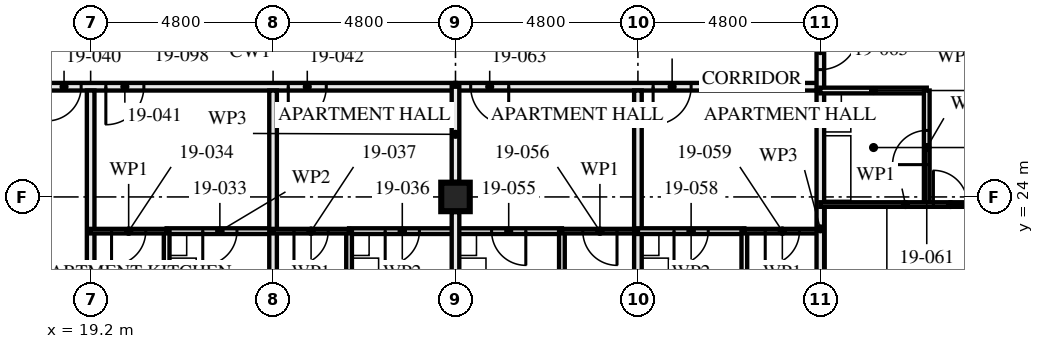
"""IFC4 building model, lengths in metres.
Left out: names, types, materials, properties, quantities, classifications, styles, units other than length and angle.
Written with IfcOpenShell. Run it as: python <this file> out.ifc"""

import sys

from ifc_helpers import new_model, si_unit, direction, frame, frame_2d, origin, origin_2d, place, context, subcontext, project, spatial, rectangle, hollow_rectangle, extrude, element, fill, save


model = new_model("IFC4")
c1 = context("Model", 3, precision=1e-05, world=origin(), true_north=direction((0.0, 1.0)))
c2 = subcontext(c1, "Body", "Model", "MODEL_VIEW")
j1 = project(units=[si_unit("LENGTHUNIT", "METRE"), si_unit("PLANEANGLEUNIT", "RADIAN")], contexts=[c1])
p1 = place(None, origin())
s1 = spatial("IfcSite", under=j1, at=p1, CompositionType="ELEMENT")
p2 = place(p1, origin())
s2 = spatial("IfcBuilding", under=s1, at=p2, CompositionType="ELEMENT")
p3 = place(p2, frame((0.0, 0.0, 72.5)))
s3 = spatial("IfcBuildingStorey", under=s2, at=p3, CompositionType="ELEMENT", Elevation=72.5)
p4 = place(p3, frame((28.8, 24.0, 0.0), z_axis=(0.0, 0.0, 1.0), x_axis=(1.0, 0.0, 0.0)))
e1 = element("IfcColumn", 1, at=p4, inside=s3, PredefinedType="COLUMN", context=c2, shape_type="SweptSolid", body=[
    extrude(hollow_rectangle(XDim=0.75, YDim=0.75, WallThickness=0.08, at=origin_2d()), origin(), (0.0, 0.0, 1.0), 3.5),
])
p5 = place(p3, frame((19.2, 14.72, 0.0), z_axis=(0.0, 0.0, 1.0), x_axis=(0.0, 1.0, 0.0)))
e2 = element("IfcWall", 2, at=p5, inside=s3, PredefinedType="PARTITIONING", context=c2, shape_type="SweptSolid", body=[
    extrude(rectangle(XDim=12.08, YDim=0.2, at=frame_2d((6.04, 0.0))), origin(), (0.0, 0.0, 1.0), 2.55),
])
p6 = place(p3, frame((21.2, 20.1, 0.0), z_axis=(0.0, 0.0, 1.0), x_axis=(0.0, 1.0, 0.0)))
e3 = element("IfcWall", 3, at=p6, inside=s3, PredefinedType="PARTITIONING", context=c2, shape_type="SweptSolid", body=[
    extrude(rectangle(XDim=3.0, YDim=0.15, at=frame_2d((1.5, 0.0))), origin(), (0.0, 0.0, 1.0), 3.33),
])
p7 = place(p3, frame((21.2, 23.1, 0.0), z_axis=(0.0, 0.0, 1.0), x_axis=(1.0, 0.0, 0.0)))
e4 = element("IfcWall", 4, at=p7, inside=s3, PredefinedType="PARTITIONING", context=c2, shape_type="SweptSolid", body=[
    extrude(rectangle(XDim=2.8, YDim=0.15, at=frame_2d((1.4, 0.0))), origin(), (0.0, 0.0, 1.0), 3.33),
])
p8 = place(p7, frame((0.95, 0.0, 0.0)))
e5 = element("IfcOpeningElement", 5, at=p8, cuts=e4, PredefinedType="OPENING", context=c2, shape_type="SweptSolid", body=[
    extrude(rectangle(XDim=0.9, YDim=2.1, at=frame_2d((0.45, 1.05))), frame((0.0, 0.085, 0.0), z_axis=(0.0, -1.0, 0.0), x_axis=(1.0, 0.0, 0.0)), (0.0, 0.0, 1.0), 0.171),
])
p9 = place(p3, frame((19.2, 23.1, 0.0), z_axis=(0.0, 0.0, 1.0), x_axis=(1.0, 0.0, 0.0)))
e6 = element("IfcWall", 6, at=p9, inside=s3, PredefinedType="PARTITIONING", context=c2, shape_type="SweptSolid", body=[
    extrude(rectangle(XDim=2.0, YDim=0.12, at=frame_2d((1.0, 0.0))), origin(), (0.0, 0.0, 1.0), 3.33),
])
p10 = place(p9, frame((0.55, 0.0, 0.0)))
e7 = element("IfcOpeningElement", 7, at=p10, cuts=e6, PredefinedType="OPENING", context=c2, shape_type="SweptSolid", body=[
    extrude(rectangle(XDim=0.9, YDim=2.1, at=frame_2d((0.45, 1.05))), frame((0.0, 0.071, 0.0), z_axis=(0.0, -1.0, 0.0), x_axis=(1.0, 0.0, 0.0)), (0.0, 0.0, 1.0), 0.141),
])
p11 = place(p3, frame((24.0, 14.72, 0.0), z_axis=(0.0, 0.0, 1.0), x_axis=(0.0, 1.0, 0.0)))
e8 = element("IfcWall", 8, at=p11, inside=s3, PredefinedType="PARTITIONING", context=c2, shape_type="SweptSolid", body=[
    extrude(rectangle(XDim=12.08, YDim=0.2, at=frame_2d((6.04, 0.0))), origin(), (0.0, 0.0, 1.0), 2.55),
])
p12 = place(p3, frame((26.0, 20.1, 0.0), z_axis=(0.0, 0.0, 1.0), x_axis=(0.0, 1.0, 0.0)))
e9 = element("IfcWall", 9, at=p12, inside=s3, PredefinedType="PARTITIONING", context=c2, shape_type="SweptSolid", body=[
    extrude(rectangle(XDim=3.0, YDim=0.15, at=frame_2d((1.5, 0.0))), origin(), (0.0, 0.0, 1.0), 3.33),
])
p13 = place(p3, frame((26.0, 23.1, 0.0), z_axis=(0.0, 0.0, 1.0), x_axis=(1.0, 0.0, 0.0)))
e10 = element("IfcWall", 10, at=p13, inside=s3, PredefinedType="PARTITIONING", context=c2, shape_type="SweptSolid", body=[
    extrude(rectangle(XDim=2.8, YDim=0.15, at=frame_2d((1.4, 0.0))), origin(), (0.0, 0.0, 1.0), 3.33),
])
p14 = place(p13, frame((0.95, 0.0, 0.0)))
e11 = element("IfcOpeningElement", 11, at=p14, cuts=e10, PredefinedType="OPENING", context=c2, shape_type="SweptSolid", body=[
    extrude(rectangle(XDim=0.9, YDim=2.1, at=frame_2d((0.45, 1.05))), frame((0.0, 0.085, 0.0), z_axis=(0.0, -1.0, 0.0), x_axis=(1.0, 0.0, 0.0)), (0.0, 0.0, 1.0), 0.171),
])
p15 = place(p3, frame((24.0, 23.1, 0.0), z_axis=(0.0, 0.0, 1.0), x_axis=(1.0, 0.0, 0.0)))
e12 = element("IfcWall", 12, at=p15, inside=s3, PredefinedType="PARTITIONING", context=c2, shape_type="SweptSolid", body=[
    extrude(rectangle(XDim=2.0, YDim=0.12, at=frame_2d((1.0, 0.0))), origin(), (0.0, 0.0, 1.0), 3.33),
])
p16 = place(p15, frame((0.55, 0.0, 0.0)))
e13 = element("IfcOpeningElement", 13, at=p16, cuts=e12, PredefinedType="OPENING", context=c2, shape_type="SweptSolid", body=[
    extrude(rectangle(XDim=0.9, YDim=2.1, at=frame_2d((0.45, 1.05))), frame((0.0, 0.071, 0.0), z_axis=(0.0, -1.0, 0.0), x_axis=(1.0, 0.0, 0.0)), (0.0, 0.0, 1.0), 0.141),
])
p17 = place(p3, frame((14.4, 26.9, 0.0), z_axis=(0.0, 0.0, 1.0), x_axis=(1.0, 0.0, 0.0)))
e14 = element("IfcWall", 14, at=p17, inside=s3, PredefinedType="PARTITIONING", context=c2, shape_type="SweptSolid", body=[
    extrude(rectangle(XDim=14.4, YDim=0.2, at=frame_2d((7.2, 0.0))), origin(), (0.0, 0.0, 1.0), 2.55),
])
p18 = place(p17, frame((1.4, 0.0, 0.0)))
e15 = element("IfcOpeningElement", 15, at=p18, cuts=e14, PredefinedType="OPENING", context=c2, shape_type="SweptSolid", body=[
    extrude(rectangle(XDim=1.0, YDim=2.1, at=frame_2d((0.5, 1.05))), frame((0.0, 0.111, 0.0), z_axis=(0.0, -1.0, 0.0), x_axis=(1.0, 0.0, 0.0)), (0.0, 0.0, 1.0), 0.221),
])
p19 = place(p17, frame((3.65, 0.0, 0.0)))
e16 = element("IfcOpeningElement", 16, at=p19, cuts=e14, PredefinedType="OPENING", context=c2, shape_type="SweptSolid", body=[
    extrude(rectangle(XDim=0.9, YDim=2.1, at=frame_2d((0.45, 1.05))), frame((0.0, 0.111, 0.0), z_axis=(0.0, -1.0, 0.0), x_axis=(1.0, 0.0, 0.0)), (0.0, 0.0, 1.0), 0.221),
])
p20 = place(p17, frame((5.2, 0.0, 0.0)))
e17 = element("IfcOpeningElement", 17, at=p20, cuts=e14, PredefinedType="OPENING", context=c2, shape_type="SweptSolid", body=[
    extrude(rectangle(XDim=1.0, YDim=2.1, at=frame_2d((0.5, 1.05))), frame((0.0, 0.111, 0.0), z_axis=(0.0, -1.0, 0.0), x_axis=(1.0, 0.0, 0.0)), (0.0, 0.0, 1.0), 0.221),
])
p21 = place(p17, frame((10.0, 0.0, 0.0)))
e18 = element("IfcOpeningElement", 18, at=p21, cuts=e14, PredefinedType="OPENING", context=c2, shape_type="SweptSolid", body=[
    extrude(rectangle(XDim=1.0, YDim=2.1, at=frame_2d((0.5, 1.05))), frame((0.0, 0.111, 0.0), z_axis=(0.0, -1.0, 0.0), x_axis=(1.0, 0.0, 0.0)), (0.0, 0.0, 1.0), 0.221),
])
p22 = place(p3, frame((31.6, 20.1, 0.0), z_axis=(0.0, 0.0, 1.0), x_axis=(0.0, 1.0, 0.0)))
e19 = element("IfcWall", 19, at=p22, inside=s3, PredefinedType="PARTITIONING", context=c2, shape_type="SweptSolid", body=[
    extrude(rectangle(XDim=3.0, YDim=0.15, at=frame_2d((1.5, 0.0))), origin(), (0.0, 0.0, 1.0), 3.33),
])
p23 = place(p3, frame((28.8, 23.1, 0.0), z_axis=(0.0, 0.0, 1.0), x_axis=(1.0, 0.0, 0.0)))
e20 = element("IfcWall", 20, at=p23, inside=s3, PredefinedType="PARTITIONING", context=c2, shape_type="SweptSolid", body=[
    extrude(rectangle(XDim=2.8, YDim=0.15, at=frame_2d((1.4, 0.0))), origin(), (0.0, 0.0, 1.0), 3.33),
])
p24 = place(p23, frame((0.95, 0.0, 0.0)))
e21 = element("IfcOpeningElement", 21, at=p24, cuts=e20, PredefinedType="OPENING", context=c2, shape_type="SweptSolid", body=[
    extrude(rectangle(XDim=0.9, YDim=2.1, at=frame_2d((0.45, 1.05))), frame((0.0, 0.085, 0.0), z_axis=(0.0, -1.0, 0.0), x_axis=(1.0, 0.0, 0.0)), (0.0, 0.0, 1.0), 0.171),
])
p25 = place(p3, frame((31.6, 23.1, 0.0), z_axis=(0.0, 0.0, 1.0), x_axis=(1.0, 0.0, 0.0)))
e22 = element("IfcWall", 22, at=p25, inside=s3, PredefinedType="PARTITIONING", context=c2, shape_type="SweptSolid", body=[
    extrude(rectangle(XDim=2.0, YDim=0.12, at=frame_2d((1.0, 0.0))), origin(), (0.0, 0.0, 1.0), 3.33),
])
p26 = place(p25, frame((0.55, 0.0, 0.0)))
e23 = element("IfcOpeningElement", 23, at=p26, cuts=e22, PredefinedType="OPENING", context=c2, shape_type="SweptSolid", body=[
    extrude(rectangle(XDim=0.9, YDim=2.1, at=frame_2d((0.45, 1.05))), frame((0.0, 0.071, 0.0), z_axis=(0.0, -1.0, 0.0), x_axis=(1.0, 0.0, 0.0)), (0.0, 0.0, 1.0), 0.141),
])
p27 = place(p3, frame((33.6, 14.72, 0.0), z_axis=(0.0, 0.0, 1.0), x_axis=(0.0, 1.0, 0.0)))
e24 = element("IfcWall", 24, at=p27, inside=s3, PredefinedType="PARTITIONING", context=c2, shape_type="SweptSolid", body=[
    extrude(rectangle(XDim=12.08, YDim=0.2, at=frame_2d((6.04, 0.0))), origin(), (0.0, 0.0, 1.0), 2.55),
])
p28 = place(p3, frame((36.4, 20.1, 0.0), z_axis=(0.0, 0.0, 1.0), x_axis=(0.0, 1.0, 0.0)))
e25 = element("IfcWall", 25, at=p28, inside=s3, PredefinedType="PARTITIONING", context=c2, shape_type="SweptSolid", body=[
    extrude(rectangle(XDim=3.0, YDim=0.15, at=frame_2d((1.5, 0.0))), origin(), (0.0, 0.0, 1.0), 3.33),
])
p29 = place(p3, frame((33.6, 23.1, 0.0), z_axis=(0.0, 0.0, 1.0), x_axis=(1.0, 0.0, 0.0)))
e26 = element("IfcWall", 26, at=p29, inside=s3, PredefinedType="PARTITIONING", context=c2, shape_type="SweptSolid", body=[
    extrude(rectangle(XDim=2.8, YDim=0.15, at=frame_2d((1.4, 0.0))), origin(), (0.0, 0.0, 1.0), 3.33),
])
p30 = place(p29, frame((0.95, 0.0, 0.0)))
e27 = element("IfcOpeningElement", 27, at=p30, cuts=e26, PredefinedType="OPENING", context=c2, shape_type="SweptSolid", body=[
    extrude(rectangle(XDim=0.9, YDim=2.1, at=frame_2d((0.45, 1.05))), frame((0.0, 0.085, 0.0), z_axis=(0.0, -1.0, 0.0), x_axis=(1.0, 0.0, 0.0)), (0.0, 0.0, 1.0), 0.171),
])
p31 = place(p3, frame((36.4, 23.1, 0.0), z_axis=(0.0, 0.0, 1.0), x_axis=(1.0, 0.0, 0.0)))
e28 = element("IfcWall", 28, at=p31, inside=s3, PredefinedType="PARTITIONING", context=c2, shape_type="SweptSolid", body=[
    extrude(rectangle(XDim=2.0, YDim=0.12, at=frame_2d((1.0, 0.0))), origin(), (0.0, 0.0, 1.0), 3.33),
])
p32 = place(p31, frame((0.55, 0.0, 0.0)))
e29 = element("IfcOpeningElement", 29, at=p32, cuts=e28, PredefinedType="OPENING", context=c2, shape_type="SweptSolid", body=[
    extrude(rectangle(XDim=0.9, YDim=2.1, at=frame_2d((0.45, 1.05))), frame((0.0, 0.071, 0.0), z_axis=(0.0, -1.0, 0.0), x_axis=(1.0, 0.0, 0.0)), (0.0, 0.0, 1.0), 0.141),
])
p33 = place(p3, frame((38.4, 19.52, 0.0), z_axis=(0.0, 0.0, 1.0), x_axis=(0.0, 1.0, 0.0)))
e30 = element("IfcWall", 30, at=p33, inside=s3, PredefinedType="PARTITIONING", context=c2, shape_type="SweptSolid", body=[
    extrude(rectangle(XDim=7.28, YDim=0.2, at=frame_2d((3.64, 0.0))), origin(), (0.0, 0.0, 1.0), 2.55),
])
p34 = place(p3, frame((41.2, 23.8, 0.0), z_axis=(0.0, 0.0, 1.0), x_axis=(0.0, 1.0, 0.0)))
e31 = element("IfcWall", 31, at=p34, inside=s3, PredefinedType="PARTITIONING", context=c2, shape_type="SweptSolid", body=[
    extrude(rectangle(XDim=3.0, YDim=0.15, at=frame_2d((1.5, 0.0))), origin(), (0.0, 0.0, 1.0), 2.55),
])
p35 = place(p34, frame((1.05, 0.0, 0.0)))
e32 = element("IfcOpeningElement", 32, at=p35, cuts=e31, PredefinedType="OPENING", context=c2, shape_type="SweptSolid", body=[
    extrude(rectangle(XDim=0.9, YDim=2.1, at=frame_2d((0.45, 1.05))), frame((0.0, 0.085, 0.0), z_axis=(0.0, -1.0, 0.0), x_axis=(1.0, 0.0, 0.0)), (0.0, 0.0, 1.0), 0.171),
])
p36 = place(p3, frame((38.4, 26.8, 0.0), z_axis=(0.0, 0.0, 1.0), x_axis=(1.0, 0.0, 0.0)))
e33 = element("IfcWall", 33, at=p36, inside=s3, PredefinedType="PARTITIONING", context=c2, shape_type="SweptSolid", body=[
    extrude(rectangle(XDim=2.8, YDim=0.15, at=frame_2d((1.4, 0.0))), origin(), (0.0, 0.0, 1.0), 3.33),
])
p37 = place(p3, frame((38.4, 23.8, 0.0), z_axis=(0.0, 0.0, 1.0), x_axis=(1.0, 0.0, 0.0)))
e34 = element("IfcWall", 34, at=p37, inside=s3, PredefinedType="PARTITIONING", context=c2, shape_type="SweptSolid", body=[
    extrude(rectangle(XDim=4.48, YDim=0.12, at=frame_2d((2.24, 0.0))), origin(), (0.0, 0.0, 1.0), 3.33),
])
p38 = place(p37, frame((2.975, 0.0, 0.0)))
e35 = element("IfcOpeningElement", 35, at=p38, cuts=e34, PredefinedType="OPENING", context=c2, shape_type="SweptSolid", body=[
    extrude(rectangle(XDim=0.9, YDim=2.1, at=frame_2d((0.45, 1.05))), frame((0.0, 0.071, 0.0), z_axis=(0.0, -1.0, 0.0), x_axis=(1.0, 0.0, 0.0)), (0.0, 0.0, 1.0), 0.141),
])
p39 = place(p3, frame((28.8, 26.9, 0.0), z_axis=(0.0, 0.0, 1.0), x_axis=(1.0, 0.0, 0.0)))
e36 = element("IfcWall", 36, at=p39, inside=s3, PredefinedType="PARTITIONING", context=c2, shape_type="SweptSolid", body=[
    extrude(rectangle(XDim=9.6, YDim=0.2, at=frame_2d((4.8, 0.0))), origin(), (0.0, 0.0, 1.0), 3.33),
])
p40 = place(p39, frame((0.4, 0.0, 0.0)))
e37 = element("IfcOpeningElement", 37, at=p40, cuts=e36, PredefinedType="OPENING", context=c2, shape_type="SweptSolid", body=[
    extrude(rectangle(XDim=1.0, YDim=2.1, at=frame_2d((0.5, 1.05))), frame((0.0, 0.111, 0.0), z_axis=(0.0, -1.0, 0.0), x_axis=(1.0, 0.0, 0.0)), (0.0, 0.0, 1.0), 0.221),
])
p41 = place(p39, frame((5.2, 0.0, 0.0)))
e38 = element("IfcOpeningElement", 38, at=p41, cuts=e36, PredefinedType="OPENING", context=c2, shape_type="SweptSolid", body=[
    extrude(rectangle(XDim=1.0, YDim=2.1, at=frame_2d((0.5, 1.05))), frame((0.0, 0.111, 0.0), z_axis=(0.0, -1.0, 0.0), x_axis=(1.0, 0.0, 0.0)), (0.0, 0.0, 1.0), 0.221),
])
p42 = place(p3, frame((38.4, 26.8, 0.0), z_axis=(0.0, 0.0, 1.0), x_axis=(0.0, 1.0, 0.0)))
e39 = element("IfcWall", 39, at=p42, inside=s3, PredefinedType="PARTITIONING", context=c2, shape_type="SweptSolid", body=[
    extrude(rectangle(XDim=1.605, YDim=0.2, at=frame_2d((0.802, 0.0))), origin(), (0.0, 0.0, 1.0), 3.33),
])
p43 = place(p42, frame((0.55, 0.0, 0.0)))
e40 = element("IfcOpeningElement", 40, at=p43, cuts=e39, PredefinedType="OPENING", context=c2, shape_type="SweptSolid", body=[
    extrude(rectangle(XDim=1.0, YDim=2.1, at=frame_2d((0.5, 1.05))), frame((0.0, 0.111, 0.0), z_axis=(0.0, -1.0, 0.0), x_axis=(1.0, 0.0, 0.0)), (0.0, 0.0, 1.0), 0.221),
])
p44 = place(p3, frame((28.8, 19.595, 0.0), z_axis=(0.0, 0.0, 1.0), x_axis=(0.0, 1.0, 0.0)))
e41 = element("IfcWall", 41, at=p44, inside=s3, PredefinedType="PARTITIONING", context=c2, shape_type="SweptSolid", body=[
    extrude(rectangle(XDim=4.01, YDim=0.2, at=frame_2d((2.005, 0.0))), origin(), (0.0, 0.0, 1.0), 2.32),
])
p45 = place(p3, frame((28.8, 24.395, 0.0), z_axis=(0.0, 0.0, 1.0), x_axis=(0.0, 1.0, 0.0)))
e42 = element("IfcWall", 42, at=p45, inside=s3, PredefinedType="PARTITIONING", context=c2, shape_type="SweptSolid", body=[
    extrude(rectangle(XDim=2.505, YDim=0.2, at=frame_2d((1.252, 0.0))), origin(), (0.0, 0.0, 1.0), 2.32),
])
p46 = place(p8, frame((0.9, 0.0, 0.0), z_axis=(0.0, 0.0, 1.0), x_axis=(-1.0, 0.0, 0.0)))
e43 = element("IfcDoor", 43, at=p46, inside=s3, OperationType="SINGLE_SWING_LEFT", PredefinedType="DOOR", context=c2, shape_type="SweptSolid", body=[
    extrude(rectangle(XDim=0.9, YDim=2.1, at=frame_2d((0.45, 1.05))), frame((0.0, 0.022, 0.0), z_axis=(0.0, -1.0, 0.0), x_axis=(1.0, 0.0, 0.0)), (0.0, 0.0, 1.0), 0.044),
])
fill(e5, e43)
p47 = place(p10, frame((0.9, 0.0, 0.0), z_axis=(0.0, 0.0, 1.0), x_axis=(-1.0, 0.0, 0.0)))
e44 = element("IfcDoor", 44, at=p47, inside=s3, OperationType="SINGLE_SWING_LEFT", PredefinedType="DOOR", context=c2, shape_type="SweptSolid", body=[
    extrude(rectangle(XDim=0.9, YDim=2.1, at=frame_2d((0.45, 1.05))), frame((0.0, 0.022, 0.0), z_axis=(0.0, -1.0, 0.0), x_axis=(1.0, 0.0, 0.0)), (0.0, 0.0, 1.0), 0.044),
])
fill(e7, e44)
p48 = place(p14, frame((0.9, 0.0, 0.0), z_axis=(0.0, 0.0, 1.0), x_axis=(-1.0, 0.0, 0.0)))
e45 = element("IfcDoor", 45, at=p48, inside=s3, OperationType="SINGLE_SWING_LEFT", PredefinedType="DOOR", context=c2, shape_type="SweptSolid", body=[
    extrude(rectangle(XDim=0.9, YDim=2.1, at=frame_2d((0.45, 1.05))), frame((0.0, 0.022, 0.0), z_axis=(0.0, -1.0, 0.0), x_axis=(1.0, 0.0, 0.0)), (0.0, 0.0, 1.0), 0.044),
])
fill(e11, e45)
p49 = place(p16, frame((0.9, 0.0, 0.0), z_axis=(0.0, 0.0, 1.0), x_axis=(-1.0, 0.0, 0.0)))
e46 = element("IfcDoor", 46, at=p49, inside=s3, OperationType="SINGLE_SWING_LEFT", PredefinedType="DOOR", context=c2, shape_type="SweptSolid", body=[
    extrude(rectangle(XDim=0.9, YDim=2.1, at=frame_2d((0.45, 1.05))), frame((0.0, 0.022, 0.0), z_axis=(0.0, -1.0, 0.0), x_axis=(1.0, 0.0, 0.0)), (0.0, 0.0, 1.0), 0.044),
])
fill(e13, e46)
p50 = place(p19, frame((0.9, 0.0, 0.0), z_axis=(0.0, 0.0, 1.0), x_axis=(-1.0, 0.0, 0.0)))
e47 = element("IfcDoor", 47, at=p50, inside=s3, OperationType="SINGLE_SWING_LEFT", PredefinedType="DOOR", context=c2, shape_type="SweptSolid", body=[
    extrude(rectangle(XDim=0.9, YDim=2.1, at=frame_2d((0.45, 1.05))), frame((0.0, 0.027, 0.0), z_axis=(0.0, -1.0, 0.0), x_axis=(1.0, 0.0, 0.0)), (0.0, 0.0, 1.0), 0.054),
])
fill(e16, e47)
p51 = place(p20, frame((1.0, 0.0, 0.0), z_axis=(0.0, 0.0, 1.0), x_axis=(-1.0, 0.0, 0.0)))
e48 = element("IfcDoor", 48, at=p51, inside=s3, OperationType="SINGLE_SWING_LEFT", PredefinedType="DOOR", context=c2, shape_type="SweptSolid", body=[
    extrude(rectangle(XDim=1.0, YDim=2.1, at=frame_2d((0.5, 1.05))), frame((0.0, 0.027, 0.0), z_axis=(0.0, -1.0, 0.0), x_axis=(1.0, 0.0, 0.0)), (0.0, 0.0, 1.0), 0.054),
])
fill(e17, e48)
p52 = place(p21, frame((1.0, 0.0, 0.0), z_axis=(0.0, 0.0, 1.0), x_axis=(-1.0, 0.0, 0.0)))
e49 = element("IfcDoor", 49, at=p52, inside=s3, OperationType="SINGLE_SWING_LEFT", PredefinedType="DOOR", context=c2, shape_type="SweptSolid", body=[
    extrude(rectangle(XDim=1.0, YDim=2.1, at=frame_2d((0.5, 1.05))), frame((0.0, 0.027, 0.0), z_axis=(0.0, -1.0, 0.0), x_axis=(1.0, 0.0, 0.0)), (0.0, 0.0, 1.0), 0.054),
])
fill(e18, e49)
p53 = place(p24, frame((0.9, 0.0, 0.0), z_axis=(0.0, 0.0, 1.0), x_axis=(-1.0, 0.0, 0.0)))
e50 = element("IfcDoor", 50, at=p53, inside=s3, OperationType="SINGLE_SWING_RIGHT", PredefinedType="DOOR", context=c2, shape_type="SweptSolid", body=[
    extrude(rectangle(XDim=0.9, YDim=2.1, at=frame_2d((0.45, 1.05))), frame((0.0, 0.022, 0.0), z_axis=(0.0, -1.0, 0.0), x_axis=(1.0, 0.0, 0.0)), (0.0, 0.0, 1.0), 0.044),
])
fill(e21, e50)
p54 = place(p26, frame((0.9, 0.0, 0.0), z_axis=(0.0, 0.0, 1.0), x_axis=(-1.0, 0.0, 0.0)))
e51 = element("IfcDoor", 51, at=p54, inside=s3, OperationType="SINGLE_SWING_RIGHT", PredefinedType="DOOR", context=c2, shape_type="SweptSolid", body=[
    extrude(rectangle(XDim=0.9, YDim=2.1, at=frame_2d((0.45, 1.05))), frame((0.0, 0.022, 0.0), z_axis=(0.0, -1.0, 0.0), x_axis=(1.0, 0.0, 0.0)), (0.0, 0.0, 1.0), 0.044),
])
fill(e23, e51)
p55 = place(p30, frame((0.9, 0.0, 0.0), z_axis=(0.0, 0.0, 1.0), x_axis=(-1.0, 0.0, 0.0)))
e52 = element("IfcDoor", 52, at=p55, inside=s3, OperationType="SINGLE_SWING_LEFT", PredefinedType="DOOR", context=c2, shape_type="SweptSolid", body=[
    extrude(rectangle(XDim=0.9, YDim=2.1, at=frame_2d((0.45, 1.05))), frame((0.0, 0.022, 0.0), z_axis=(0.0, -1.0, 0.0), x_axis=(1.0, 0.0, 0.0)), (0.0, 0.0, 1.0), 0.044),
])
fill(e27, e52)
p56 = place(p32, frame((0.9, 0.0, 0.0), z_axis=(0.0, 0.0, 1.0), x_axis=(-1.0, 0.0, 0.0)))
e53 = element("IfcDoor", 53, at=p56, inside=s3, OperationType="SINGLE_SWING_LEFT", PredefinedType="DOOR", context=c2, shape_type="SweptSolid", body=[
    extrude(rectangle(XDim=0.9, YDim=2.1, at=frame_2d((0.45, 1.05))), frame((0.0, 0.022, 0.0), z_axis=(0.0, -1.0, 0.0), x_axis=(1.0, 0.0, 0.0)), (0.0, 0.0, 1.0), 0.044),
])
fill(e29, e53)
p57 = place(p35, origin())
e54 = element("IfcDoor", 54, at=p57, inside=s3, OperationType="SINGLE_SWING_RIGHT", PredefinedType="DOOR", context=c2, shape_type="SweptSolid", body=[
    extrude(rectangle(XDim=0.9, YDim=2.1, at=frame_2d((0.45, 1.05))), frame((0.0, 0.022, 0.0), z_axis=(0.0, -1.0, 0.0), x_axis=(1.0, 0.0, 0.0)), (0.0, 0.0, 1.0), 0.044),
])
fill(e32, e54)
p58 = place(p38, origin())
e55 = element("IfcDoor", 55, at=p58, inside=s3, OperationType="SINGLE_SWING_RIGHT", PredefinedType="DOOR", context=c2, shape_type="SweptSolid", body=[
    extrude(rectangle(XDim=0.9, YDim=2.1, at=frame_2d((0.45, 1.05))), frame((0.0, 0.022, 0.0), z_axis=(0.0, -1.0, 0.0), x_axis=(1.0, 0.0, 0.0)), (0.0, 0.0, 1.0), 0.044),
])
fill(e35, e55)
p59 = place(p40, frame((1.0, 0.0, 0.0), z_axis=(0.0, 0.0, 1.0), x_axis=(-1.0, 0.0, 0.0)))
e56 = element("IfcDoor", 56, at=p59, inside=s3, OperationType="SINGLE_SWING_RIGHT", PredefinedType="DOOR", context=c2, shape_type="SweptSolid", body=[
    extrude(rectangle(XDim=1.0, YDim=2.1, at=frame_2d((0.5, 1.05))), frame((0.0, 0.027, 0.0), z_axis=(0.0, -1.0, 0.0), x_axis=(1.0, 0.0, 0.0)), (0.0, 0.0, 1.0), 0.054),
])
fill(e37, e56)
p60 = place(p41, frame((1.0, 0.0, 0.0), z_axis=(0.0, 0.0, 1.0), x_axis=(-1.0, 0.0, 0.0)))
e57 = element("IfcDoor", 57, at=p60, inside=s3, OperationType="SINGLE_SWING_LEFT", PredefinedType="DOOR", context=c2, shape_type="SweptSolid", body=[
    extrude(rectangle(XDim=1.0, YDim=2.1, at=frame_2d((0.5, 1.05))), frame((0.0, 0.027, 0.0), z_axis=(0.0, -1.0, 0.0), x_axis=(1.0, 0.0, 0.0)), (0.0, 0.0, 1.0), 0.054),
])
fill(e38, e57)
p61 = place(p43, frame((1.0, 0.0, 0.0), z_axis=(0.0, 0.0, 1.0), x_axis=(-1.0, 0.0, 0.0)))
e58 = element("IfcDoor", 58, at=p61, inside=s3, OperationType="SINGLE_SWING_RIGHT", PredefinedType="DOOR", context=c2, shape_type="SweptSolid", body=[
    extrude(rectangle(XDim=1.0, YDim=2.1, at=frame_2d((0.5, 1.05))), frame((0.0, 0.027, 0.0), z_axis=(0.0, -1.0, 0.0), x_axis=(1.0, 0.0, 0.0)), (0.0, 0.0, 1.0), 0.054),
])
fill(e40, e58)
save(model, sys.argv[1])
